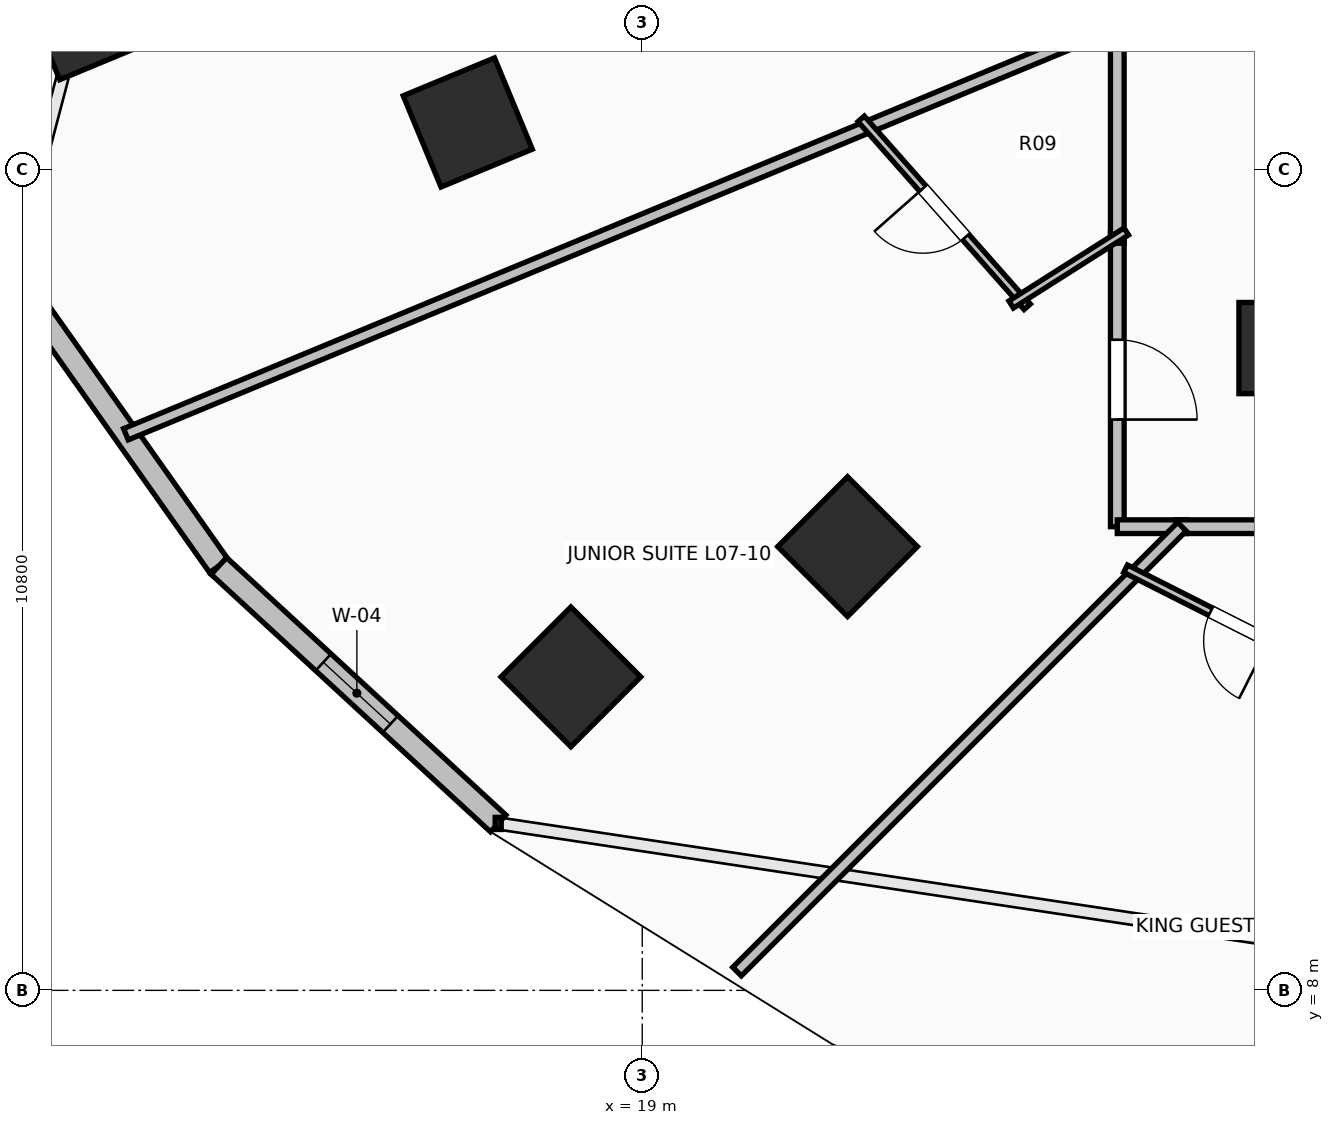
"""IFC4 building model, lengths in metres.
Left out: names, types, materials, properties, quantities, classifications, styles, units other than length and angle.
Written with IfcOpenShell. Run it as: python <this file> out.ifc"""

import sys

from ifc_helpers import new_model, si_unit, direction, frame, frame_2d, origin, origin_2d, place, context, subcontext, project, spatial, rectangle, extrude, element, fill, save


model = new_model("IFC4")
c1 = context("Model", 3, precision=1e-05, world=origin(), true_north=direction((0.0, 1.0)))
c2 = subcontext(c1, "Body", "Model", "MODEL_VIEW")
j1 = project(units=[si_unit("LENGTHUNIT", "METRE"), si_unit("PLANEANGLEUNIT", "RADIAN")], contexts=[c1])
p1 = place(None, origin())
s1 = spatial("IfcSite", under=j1, at=p1, CompositionType="ELEMENT")
p2 = place(p1, origin())
s2 = spatial("IfcBuilding", under=s1, at=p2, CompositionType="ELEMENT")
p3 = place(p2, frame((0.0, 0.0, 31.0)))
s3 = spatial("IfcBuildingStorey", under=s2, at=p3, CompositionType="ELEMENT", Elevation=31.0)
for number, where, z_axis, x_axis in (
    (1, (16.705, 19.418, 0.0), (0.0, 0.0, 1.0), (-0.924, -0.383, 0.0)),
    (2, (21.701, 13.838, 0.0), (0.0, 0.0, 1.0), (-0.707, -0.707, 0.0)),
    (3, (11.688, 20.83, 0.0), (0.0, 0.0, 1.0), (-0.924, -0.383, 0.0)),
    (4, (18.061, 12.124, 0.0), (0.0, 0.0, 1.0), (-0.707, -0.707, 0.0)),
):
    element("IfcColumn", number, at=place(p3, frame(where, z_axis=z_axis, x_axis=x_axis)), inside=s3, PredefinedType="COLUMN", context=c2, shape_type="SweptSolid", body=[
        extrude(rectangle(XDim=1.3, YDim=1.3, at=origin_2d()), origin(), (0.0, 0.0, 1.0), 3.5),
    ])
p4 = place(p3, frame((27.25, 16.45, 0.0), z_axis=(0.0, 0.0, 1.0), x_axis=(1.0, 0.0, 0.0)))
e5 = element("IfcColumn", 5, at=p4, inside=s3, PredefinedType="PILASTER", context=c2, shape_type="SweptSolid", body=[
    extrude(rectangle(XDim=0.8, YDim=1.2, at=origin_2d()), origin(), (0.0, 0.0, 1.0), 3.5),
])
p5 = place(p3, frame((10.699, 17.447, 0.0), z_axis=(0.0, 0.0, 1.0), x_axis=(0.577130815624, -0.816651713803, 0.0)))
e6 = element("IfcWall", 6, at=p5, inside=s3, PredefinedType="STANDARD", context=c2, shape_type="SweptSolid", body=[
    extrude(rectangle(XDim=4.731, YDim=0.3, at=frame_2d((2.366, 0.0))), origin(), (0.0, 0.0, 1.0), 3.24),
])
p6 = place(p3, frame((13.43, 13.583, 0.0), z_axis=(0.0, 0.0, 1.0), x_axis=(0.735342629635, -0.677695519419, 0.0)))
e7 = element("IfcWall", 7, at=p6, inside=s3, PredefinedType="STANDARD", context=c2, shape_type="SweptSolid", body=[
    extrude(rectangle(XDim=4.997, YDim=0.3, at=frame_2d((2.499, 0.0))), origin(), (0.0, 0.0, 1.0), 3.24),
])
p7 = place(p6, frame((1.869, 0.0, 0.85)))
e8 = element("IfcOpeningElement", 8, at=p7, cuts=e7, PredefinedType="OPENING", context=c2, shape_type="SweptSolid", body=[
    extrude(rectangle(XDim=1.2, YDim=1.95, at=frame_2d((0.6, 0.975))), frame((0.0, 0.165, 0.0), z_axis=(0.0, -1.0, 0.0), x_axis=(1.0, 0.0, 0.0)), (0.0, 0.0, 1.0), 0.33),
])
p8 = place(p3, frame((25.25, 17.969, 0.0), z_axis=(0.0, 0.0, 1.0), x_axis=(0.0, -1.0, 0.0)))
e9 = element("IfcWall", 9, at=p8, inside=s3, PredefinedType="PARTITIONING", context=c2, shape_type="SweptSolid", body=[
    extrude(rectangle(XDim=3.869, YDim=0.18, at=frame_2d((1.935, 0.0))), origin(), (0.0, 0.0, 1.0), 2.432),
])
p9 = place(p8, frame((1.409, 0.0, 0.0)))
e10 = element("IfcOpeningElement", 10, at=p9, cuts=e9, PredefinedType="OPENING", context=c2, shape_type="SweptSolid", body=[
    extrude(rectangle(XDim=1.05, YDim=2.2, at=frame_2d((0.525, 1.1))), frame((0.0, 0.105, 0.0), z_axis=(0.0, -1.0, 0.0), x_axis=(1.0, 0.0, 0.0)), (0.0, 0.0, 1.0), 0.21),
])
p10 = place(p3, frame((25.25, 14.1, 0.0), z_axis=(0.0, 0.0, 1.0), x_axis=(1.0, 0.0, 0.0)))
e11 = element("IfcWall", 11, at=p10, inside=s3, PredefinedType="PARTITIONING", context=c2, shape_type="SweptSolid", body=[
    extrude(rectangle(XDim=0.91, YDim=0.18, at=frame_2d((0.455, 0.0))), origin(), (0.0, 0.0, 1.0), 3.24),
])
p11 = place(p3, frame((25.25, 20.794, 0.0), z_axis=(0.0, 0.0, 1.0), x_axis=(0.0, -1.0, 0.0)))
e12 = element("IfcWall", 12, at=p11, inside=s3, PredefinedType="PARTITIONING", context=c2, shape_type="SweptSolid", body=[
    extrude(rectangle(XDim=2.965, YDim=0.18, at=frame_2d((1.482, 0.0))), origin(), (0.0, 0.0, 1.0), 3.24),
])
p12 = place(p3, frame((26.02, 14.1, 0.0), z_axis=(0.0, 0.0, 1.0), x_axis=(1.0, 0.0, 0.0)))
e13 = element("IfcWall", 13, at=p12, inside=s3, PredefinedType="PARTITIONING", context=c2, shape_type="SweptSolid", body=[
    extrude(rectangle(XDim=3.684, YDim=0.18, at=frame_2d((1.842, 0.0))), origin(), (0.0, 0.0, 1.0), 2.432),
])
p13 = place(p3, frame((12.207, 15.316, 0.0), z_axis=(0.0, 0.0, 1.0), x_axis=(0.923866969846, 0.382713759914, 0.0)))
e14 = element("IfcWall", 14, at=p13, inside=s3, PredefinedType="PARTITIONING", context=c2, shape_type="SweptSolid", body=[
    extrude(rectangle(XDim=14.118, YDim=0.16, at=frame_2d((7.059, 0.0))), origin(), (0.0, 0.0, 1.0), 2.432),
])
p14 = place(p3, frame((24.065, 16.993, 0.0), z_axis=(0.0, 0.0, 1.0), x_axis=(-0.662059609276, 0.749451181709, 0.0)))
e15 = element("IfcWall", 15, at=p14, inside=s3, PredefinedType="PARTITIONING", context=c2, shape_type="SweptSolid", body=[
    extrude(rectangle(XDim=3.299, YDim=0.11, at=frame_2d((1.65, 0.0))), origin(), (0.0, 0.0, 1.0), 2.432),
])
p15 = place(p14, frame((1.225, 0.0, 0.0)))
e16 = element("IfcOpeningElement", 16, at=p15, cuts=e15, PredefinedType="OPENING", context=c2, shape_type="SweptSolid", body=[
    extrude(rectangle(XDim=0.85, YDim=2.1, at=frame_2d((0.425, 1.05))), frame((0.0, 0.07, 0.0), z_axis=(0.0, -1.0, 0.0), x_axis=(1.0, 0.0, 0.0)), (0.0, 0.0, 1.0), 0.14),
])
p16 = place(p3, frame((25.368, 17.984, 0.0), z_axis=(0.0, 0.0, 1.0), x_axis=(-0.844361394482, -0.535774052665, 0.0)))
e17 = element("IfcWall", 17, at=p16, inside=s3, PredefinedType="PARTITIONING", context=c2, shape_type="SweptSolid", body=[
    extrude(rectangle(XDim=1.793, YDim=0.11, at=frame_2d((0.897, 0.0))), origin(), (0.0, 0.0, 1.0), 2.432),
])
p17 = place(p3, frame((20.247, 8.247, 0.0), z_axis=(0.0, 0.0, 1.0), x_axis=(0.707106781187, 0.707106781187, 0.0)))
e18 = element("IfcWall", 18, at=p17, inside=s3, PredefinedType="PARTITIONING", context=c2, shape_type="SweptSolid", body=[
    extrude(rectangle(XDim=8.277, YDim=0.16, at=frame_2d((4.139, 0.0))), origin(), (0.0, 0.0, 1.0), 2.624),
])
p18 = place(p3, frame((28.354, 12.034, 0.0), z_axis=(0.0, 0.0, 1.0), x_axis=(-0.892556909034, 0.450934767052, 0.0)))
e19 = element("IfcWall", 19, at=p18, inside=s3, PredefinedType="PARTITIONING", context=c2, shape_type="SweptSolid", body=[
    extrude(rectangle(XDim=3.356, YDim=0.11, at=frame_2d((1.678, 0.0))), origin(), (0.0, 0.0, 1.0), 2.432),
])
p19 = place(p18, frame((1.253, 0.0, 0.0)))
e20 = element("IfcOpeningElement", 20, at=p19, cuts=e19, PredefinedType="OPENING", context=c2, shape_type="SweptSolid", body=[
    extrude(rectangle(XDim=0.85, YDim=2.1, at=frame_2d((0.425, 1.05))), frame((0.0, 0.07, 0.0), z_axis=(0.0, -1.0, 0.0), x_axis=(1.0, 0.0, 0.0)), (0.0, 0.0, 1.0), 0.14),
])
p20 = place(p7, origin())
e21 = element("IfcWindow", 21, at=p20, inside=s3, PartitioningType="SINGLE_PANEL", PredefinedType="WINDOW", context=c2, shape_type="SweptSolid", body=[
    extrude(rectangle(XDim=1.2, YDim=1.95, at=frame_2d((0.6, 0.975))), frame((0.0, 0.03, 0.0), z_axis=(0.0, -1.0, 0.0), x_axis=(1.0, 0.0, 0.0)), (0.0, 0.0, 1.0), 0.06),
])
fill(e8, e21)
p21 = place(p9, origin())
e22 = element("IfcDoor", 22, at=p21, inside=s3, OperationType="SINGLE_SWING_RIGHT", PredefinedType="DOOR", context=c2, shape_type="SweptSolid", body=[
    extrude(rectangle(XDim=1.05, YDim=2.2, at=frame_2d((0.525, 1.1))), frame((0.0, 0.025, 0.0), z_axis=(0.0, -1.0, 0.0), x_axis=(1.0, 0.0, 0.0)), (0.0, 0.0, 1.0), 0.05),
])
fill(e10, e22)
p22 = place(p15, origin())
e23 = element("IfcDoor", 23, at=p22, inside=s3, OperationType="SINGLE_SWING_RIGHT", PredefinedType="DOOR", context=c2, shape_type="SweptSolid", body=[
    extrude(rectangle(XDim=0.85, YDim=2.1, at=frame_2d((0.425, 1.05))), frame((0.0, 0.025, 0.0), z_axis=(0.0, -1.0, 0.0), x_axis=(1.0, 0.0, 0.0)), (0.0, 0.0, 1.0), 0.05),
])
fill(e16, e23)
p23 = place(p19, origin())
e24 = element("IfcDoor", 24, at=p23, inside=s3, OperationType="SINGLE_SWING_LEFT", PredefinedType="DOOR", context=c2, shape_type="SweptSolid", body=[
    extrude(rectangle(XDim=0.85, YDim=2.1, at=frame_2d((0.425, 1.05))), frame((0.0, 0.025, 0.0), z_axis=(0.0, -1.0, 0.0), x_axis=(1.0, 0.0, 0.0)), (0.0, 0.0, 1.0), 0.05),
])
fill(e20, e24)
save(model, sys.argv[1])
